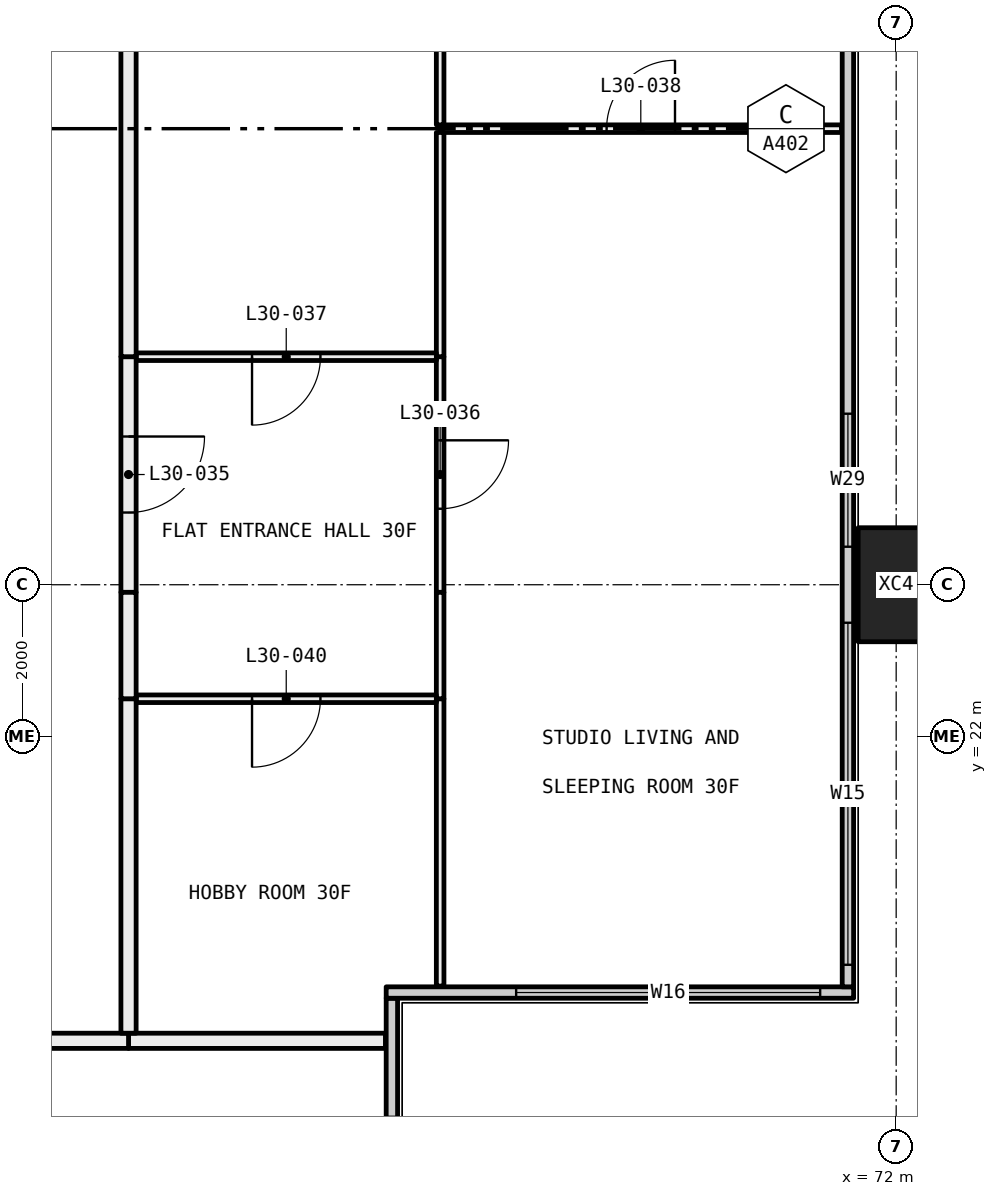
"""IFC4 building model, lengths in metres.
Left out: names, types, materials, properties, quantities, classifications, styles, units other than length and angle.
Written with IfcOpenShell. Run it as: python <this file> out.ifc"""

import sys

from ifc_helpers import new_model, si_unit, direction, frame, frame_2d, origin, origin_2d, place, context, subcontext, project, spatial, rectangle, hollow_rectangle, extrude, element, fill, save


model = new_model("IFC4")
c1 = context("Model", 3, precision=1e-05, world=origin(), true_north=direction((0.0, 1.0)))
c2 = subcontext(c1, "Body", "Model", "MODEL_VIEW")
j1 = project(units=[si_unit("LENGTHUNIT", "METRE"), si_unit("PLANEANGLEUNIT", "RADIAN")], contexts=[c1])
p1 = place(None, origin())
s1 = spatial("IfcSite", under=j1, at=p1, CompositionType="ELEMENT")
p2 = place(p1, origin())
s2 = spatial("IfcBuilding", under=s1, at=p2, CompositionType="ELEMENT")
p3 = place(p2, frame((0.0, 0.0, 117.3)))
s3 = spatial("IfcBuildingStorey", under=s2, at=p3, CompositionType="ELEMENT", Elevation=117.3)
p4 = place(p3, frame((72.0, 24.0, -0.4), z_axis=(0.0, 0.0, 1.0), x_axis=(0.0, 1.0, 0.0)))
e1 = element("IfcColumn", 1, at=p4, inside=s3, PredefinedType="COLUMN", context=c2, shape_type="SweptSolid", body=[
    extrude(hollow_rectangle(XDim=1.5, YDim=1.0, WallThickness=0.06, at=origin_2d()), origin(), (0.0, 0.0, 1.0), 3.45),
])
p5 = place(p3, frame((65.365, 12.71, 0.0), z_axis=(0.0, 0.0, 1.0), x_axis=(0.0, 1.0, 0.0)))
e2 = element("IfcWall", 2, at=p5, inside=s3, PredefinedType="ELEMENTEDWALL", context=c2, shape_type="SweptSolid", body=[
    extrude(rectangle(XDim=5.85, YDim=0.15, at=frame_2d((2.925, 0.0))), origin(), (0.0, 0.0, 1.0), 3.05),
])
p6 = place(p5, frame((0.29, 0.0, 0.45)))
e3 = element("IfcOpeningElement", 3, at=p6, cuts=e2, PredefinedType="OPENING", context=c2, shape_type="SweptSolid", body=[
    extrude(rectangle(XDim=4.0, YDim=2.55, at=frame_2d((2.0, 1.275))), frame((0.0, 0.085, 0.0), z_axis=(0.0, -1.0, 0.0), x_axis=(1.0, 0.0, 0.0)), (0.0, 0.0, 1.0), 0.17),
])
p7 = place(p3, frame((65.29, 18.635, 0.0), z_axis=(0.0, 0.0, 1.0), x_axis=(1.0, 0.0, 0.0)))
e4 = element("IfcWall", 4, at=p7, inside=s3, PredefinedType="ELEMENTEDWALL", context=c2, shape_type="SweptSolid", body=[
    extrude(rectangle(XDim=6.15, YDim=0.15, at=frame_2d((3.075, 0.0))), origin(), (0.0, 0.0, 1.0), 3.05),
])
p8 = place(p7, frame((1.71, 0.0, 0.45)))
e5 = element("IfcOpeningElement", 5, at=p8, cuts=e4, PredefinedType="OPENING", context=c2, shape_type="SweptSolid", body=[
    extrude(rectangle(XDim=4.0, YDim=2.55, at=frame_2d((2.0, 1.275))), frame((0.0, 0.085, 0.0), z_axis=(0.0, -1.0, 0.0), x_axis=(1.0, 0.0, 0.0)), (0.0, 0.0, 1.0), 0.17),
])
p9 = place(p3, frame((71.365, 18.71, 0.0), z_axis=(0.0, 0.0, 1.0), x_axis=(0.0, 1.0, 0.0)))
e6 = element("IfcWall", 6, at=p9, inside=s3, PredefinedType="ELEMENTEDWALL", context=c2, shape_type="SweptSolid", body=[
    extrude(rectangle(XDim=22.58, YDim=0.15, at=frame_2d((11.29, 0.0))), origin(), (0.0, 0.0, 1.0), 3.05),
])
p10 = place(p9, frame((0.29, 0.0, 0.45)))
e7 = element("IfcOpeningElement", 7, at=p10, cuts=e6, PredefinedType="OPENING", context=c2, shape_type="SweptSolid", body=[
    extrude(rectangle(XDim=4.5, YDim=2.55, at=frame_2d((2.25, 1.275))), frame((0.0, 0.085, 0.0), z_axis=(0.0, -1.0, 0.0), x_axis=(1.0, 0.0, 0.0)), (0.0, 0.0, 1.0), 0.17),
])
p11 = place(p9, frame((5.79, 0.0, 0.45)))
e8 = element("IfcOpeningElement", 8, at=p11, cuts=e6, PredefinedType="OPENING", context=c2, shape_type="SweptSolid", body=[
    extrude(rectangle(XDim=1.75, YDim=2.55, at=frame_2d((0.875, 1.275))), frame((0.0, 0.085, 0.0), z_axis=(0.0, -1.0, 0.0), x_axis=(1.0, 0.0, 0.0)), (0.0, 0.0, 1.0), 0.17),
])
p12 = place(p9, frame((15.04, 0.0, 0.45)))
e9 = element("IfcOpeningElement", 9, at=p12, cuts=e6, PredefinedType="OPENING", context=c2, shape_type="SweptSolid", body=[
    extrude(rectangle(XDim=1.75, YDim=2.55, at=frame_2d((0.875, 1.275))), frame((0.0, 0.085, 0.0), z_axis=(0.0, -1.0, 0.0), x_axis=(1.0, 0.0, 0.0)), (0.0, 0.0, 1.0), 0.17),
])
p13 = place(p9, frame((17.79, 0.0, 0.45)))
e10 = element("IfcOpeningElement", 10, at=p13, cuts=e6, PredefinedType="OPENING", context=c2, shape_type="SweptSolid", body=[
    extrude(rectangle(XDim=4.5, YDim=2.55, at=frame_2d((2.25, 1.275))), frame((0.0, 0.085, 0.0), z_axis=(0.0, -1.0, 0.0), x_axis=(1.0, 0.0, 0.0)), (0.0, 0.0, 1.0), 0.17),
])
p14 = place(p3, frame((65.28, 18.0, 0.0), z_axis=(0.0, 0.0, 1.0), x_axis=(-1.0, 0.0, 0.0)))
e11 = element("IfcWall", 11, at=p14, inside=s3, PredefinedType="PARTITIONING", context=c2, shape_type="SweptSolid", body=[
    extrude(rectangle(XDim=3.38, YDim=0.2, at=frame_2d((1.69, 0.0))), origin(), (0.0, 0.0, 1.0), 3.05),
])
p15 = place(p3, frame((61.9, 18.0, 0.0), z_axis=(0.0, 0.0, 1.0), x_axis=(-1.0, 0.0, 0.0)))
e12 = element("IfcWall", 12, at=p15, inside=s3, PredefinedType="PARTITIONING", context=c2, shape_type="SweptSolid", body=[
    extrude(rectangle(XDim=7.9, YDim=0.2, at=frame_2d((3.95, 0.0))), origin(), (0.0, 0.0, 1.0), 3.05),
])
p16 = place(p3, frame((71.28, 30.0, 0.0), z_axis=(0.0, 0.0, 1.0), x_axis=(-1.0, 0.0, 0.0)))
e13 = element("IfcWall", 13, at=p16, inside=s3, PredefinedType="PARTITIONING", context=c2, shape_type="SweptSolid", body=[
    extrude(rectangle(XDim=5.28, YDim=0.1, at=frame_2d((2.64, 0.0))), origin(), (0.0, 0.0, 1.0), 3.05),
])
p17 = place(p16, frame((2.19, 0.0, 0.0)))
e14 = element("IfcOpeningElement", 14, at=p17, cuts=e13, PredefinedType="OPENING", context=c2, shape_type="SweptSolid", body=[
    extrude(rectangle(XDim=0.9, YDim=2.1, at=frame_2d((0.45, 1.05))), frame((0.0, 0.06, 0.0), z_axis=(0.0, -1.0, 0.0), x_axis=(1.0, 0.0, 0.0)), (0.0, 0.0, 1.0), 0.12),
])
p18 = place(p3, frame((66.0, 22.5, 0.0), z_axis=(0.0, 0.0, 1.0), x_axis=(0.0, -1.0, 0.0)))
e15 = element("IfcWall", 15, at=p18, inside=s3, PredefinedType="PARTITIONING", context=c2, shape_type="SweptSolid", body=[
    extrude(rectangle(XDim=3.78, YDim=0.1, at=frame_2d((1.89, 0.0))), origin(), (0.0, 0.0, 1.0), 3.05),
])
p19 = place(p3, frame((66.0, 27.0, 0.0), z_axis=(0.0, 0.0, 1.0), x_axis=(0.0, -1.0, 0.0)))
e16 = element("IfcWall", 16, at=p19, inside=s3, PredefinedType="PARTITIONING", context=c2, shape_type="SweptSolid", body=[
    extrude(rectangle(XDim=3.1, YDim=0.1, at=frame_2d((1.55, 0.0))), origin(), (0.0, 0.0, 1.0), 2.45),
])
p20 = place(p19, frame((1.1, 0.0, 0.0)))
e17 = element("IfcOpeningElement", 17, at=p20, cuts=e16, PredefinedType="OPENING", context=c2, shape_type="SweptSolid", body=[
    extrude(rectangle(XDim=0.9, YDim=2.1, at=frame_2d((0.45, 1.05))), frame((0.0, 0.06, 0.0), z_axis=(0.0, -1.0, 0.0), x_axis=(1.0, 0.0, 0.0)), (0.0, 0.0, 1.0), 0.12),
])
p21 = place(p3, frame((66.0, 23.9, 0.0), z_axis=(0.0, 0.0, 1.0), x_axis=(0.0, -1.0, 0.0)))
e18 = element("IfcWall", 18, at=p21, inside=s3, PredefinedType="PARTITIONING", context=c2, shape_type="SweptSolid", body=[
    extrude(rectangle(XDim=1.4, YDim=0.1, at=frame_2d((0.7, 0.0))), origin(), (0.0, 0.0, 1.0), 3.05),
])
p22 = place(p3, frame((66.0, 29.95, 0.0), z_axis=(0.0, 0.0, 1.0), x_axis=(0.0, -1.0, 0.0)))
e19 = element("IfcWall", 19, at=p22, inside=s3, PredefinedType="PARTITIONING", context=c2, shape_type="SweptSolid", body=[
    extrude(rectangle(XDim=2.95, YDim=0.1, at=frame_2d((1.475, 0.0))), origin(), (0.0, 0.0, 1.0), 3.05),
])
p23 = place(p3, frame((66.0, 35.95, 0.0), z_axis=(0.0, 0.0, 1.0), x_axis=(0.0, -1.0, 0.0)))
e20 = element("IfcWall", 20, at=p23, inside=s3, PredefinedType="PARTITIONING", context=c2, shape_type="SweptSolid", body=[
    extrude(rectangle(XDim=5.9, YDim=0.1, at=frame_2d((2.95, 0.0))), origin(), (0.0, 0.0, 1.0), 2.45),
])
p24 = place(p3, frame((65.95, 22.5, 0.0), z_axis=(0.0, 0.0, 1.0), x_axis=(-1.0, 0.0, 0.0)))
e21 = element("IfcWall", 21, at=p24, inside=s3, PredefinedType="PARTITIONING", context=c2, shape_type="SweptSolid", body=[
    extrude(rectangle(XDim=3.95, YDim=0.1, at=frame_2d((1.975, 0.0))), origin(), (0.0, 0.0, 1.0), 3.05),
])
p25 = place(p24, frame((1.525, 0.0, 0.0)))
e22 = element("IfcOpeningElement", 22, at=p25, cuts=e21, PredefinedType="OPENING", context=c2, shape_type="SweptSolid", body=[
    extrude(rectangle(XDim=0.9, YDim=2.1, at=frame_2d((0.45, 1.05))), frame((0.0, 0.06, 0.0), z_axis=(0.0, -1.0, 0.0), x_axis=(1.0, 0.0, 0.0)), (0.0, 0.0, 1.0), 0.12),
])
p26 = place(p3, frame((61.9, 22.5, 0.0), z_axis=(0.0, 0.0, 1.0), x_axis=(0.0, -1.0, 0.0)))
e23 = element("IfcWall", 23, at=p26, inside=s3, PredefinedType="PARTITIONING", context=c2, shape_type="SweptSolid", body=[
    extrude(rectangle(XDim=4.4, YDim=0.2, at=frame_2d((2.2, 0.0))), origin(), (0.0, 0.0, 1.0), 3.05),
])
p27 = place(p3, frame((65.95, 27.0, 0.0), z_axis=(0.0, 0.0, 1.0), x_axis=(-1.0, 0.0, 0.0)))
e24 = element("IfcWall", 24, at=p27, inside=s3, PredefinedType="PARTITIONING", context=c2, shape_type="SweptSolid", body=[
    extrude(rectangle(XDim=3.95, YDim=0.1, at=frame_2d((1.975, 0.0))), origin(), (0.0, 0.0, 1.0), 3.05),
])
p28 = place(p27, frame((1.525, 0.0, 0.0)))
e25 = element("IfcOpeningElement", 25, at=p28, cuts=e24, PredefinedType="OPENING", context=c2, shape_type="SweptSolid", body=[
    extrude(rectangle(XDim=0.9, YDim=2.1, at=frame_2d((0.45, 1.05))), frame((0.0, 0.06, 0.0), z_axis=(0.0, -1.0, 0.0), x_axis=(1.0, 0.0, 0.0)), (0.0, 0.0, 1.0), 0.12),
])
p29 = place(p3, frame((61.9, 27.0, 0.0), z_axis=(0.0, 0.0, 1.0), x_axis=(0.0, -1.0, 0.0)))
e26 = element("IfcWall", 26, at=p29, inside=s3, PredefinedType="PARTITIONING", context=c2, shape_type="SweptSolid", body=[
    extrude(rectangle(XDim=3.1, YDim=0.2, at=frame_2d((1.55, 0.0))), origin(), (0.0, 0.0, 1.0), 2.45),
])
p30 = place(p29, frame((1.05, 0.0, 0.0)))
e27 = element("IfcOpeningElement", 27, at=p30, cuts=e26, PredefinedType="OPENING", context=c2, shape_type="SweptSolid", body=[
    extrude(rectangle(XDim=1.0, YDim=2.1, at=frame_2d((0.5, 1.05))), frame((0.0, 0.11, 0.0), z_axis=(0.0, -1.0, 0.0), x_axis=(1.0, 0.0, 0.0)), (0.0, 0.0, 1.0), 0.22),
])
p31 = place(p3, frame((61.9, 23.9, 0.0), z_axis=(0.0, 0.0, 1.0), x_axis=(0.0, -1.0, 0.0)))
e28 = element("IfcWall", 28, at=p31, inside=s3, PredefinedType="PARTITIONING", context=c2, shape_type="SweptSolid", body=[
    extrude(rectangle(XDim=1.4, YDim=0.2, at=frame_2d((0.7, 0.0))), origin(), (0.0, 0.0, 1.0), 3.05),
])
p32 = place(p3, frame((61.9, 35.9, 0.0), z_axis=(0.0, 0.0, 1.0), x_axis=(0.0, -1.0, 0.0)))
e29 = element("IfcWall", 29, at=p32, inside=s3, PredefinedType="PARTITIONING", context=c2, shape_type="SweptSolid", body=[
    extrude(rectangle(XDim=8.9, YDim=0.2, at=frame_2d((4.45, 0.0))), origin(), (0.0, 0.0, 1.0), 3.05),
])
p33 = place(p8, origin())
e30 = element("IfcWindow", 30, at=p33, inside=s3, PartitioningType="SINGLE_PANEL", PredefinedType="WINDOW", context=c2, shape_type="SweptSolid", body=[
    extrude(rectangle(XDim=4.0, YDim=2.55, at=frame_2d((2.0, 1.275))), frame((0.0, 0.03, 0.0), z_axis=(0.0, -1.0, 0.0), x_axis=(1.0, 0.0, 0.0)), (0.0, 0.0, 1.0), 0.06),
])
fill(e5, e30)
p34 = place(p10, origin())
e31 = element("IfcWindow", 31, at=p34, inside=s3, PartitioningType="SINGLE_PANEL", PredefinedType="WINDOW", context=c2, shape_type="SweptSolid", body=[
    extrude(rectangle(XDim=4.5, YDim=2.55, at=frame_2d((2.25, 1.275))), frame((0.0, 0.03, 0.0), z_axis=(0.0, -1.0, 0.0), x_axis=(1.0, 0.0, 0.0)), (0.0, 0.0, 1.0), 0.06),
])
fill(e7, e31)
p35 = place(p11, origin())
e32 = element("IfcWindow", 32, at=p35, inside=s3, PartitioningType="SINGLE_PANEL", PredefinedType="WINDOW", context=c2, shape_type="SweptSolid", body=[
    extrude(rectangle(XDim=1.75, YDim=2.55, at=frame_2d((0.875, 1.275))), frame((0.0, 0.03, 0.0), z_axis=(0.0, -1.0, 0.0), x_axis=(1.0, 0.0, 0.0)), (0.0, 0.0, 1.0), 0.06),
])
fill(e8, e32)
p36 = place(p30, origin())
e33 = element("IfcDoor", 33, at=p36, inside=s3, OperationType="SINGLE_SWING_RIGHT", PredefinedType="DOOR", context=c2, shape_type="SweptSolid", body=[
    extrude(rectangle(XDim=1.0, YDim=2.1, at=frame_2d((0.5, 1.05))), frame((0.0, 0.025, 0.0), z_axis=(0.0, -1.0, 0.0), x_axis=(1.0, 0.0, 0.0)), (0.0, 0.0, 1.0), 0.05),
])
fill(e27, e33)
p37 = place(p20, origin())
e34 = element("IfcDoor", 34, at=p37, inside=s3, OperationType="SINGLE_SWING_RIGHT", PredefinedType="DOOR", context=c2, shape_type="SweptSolid", body=[
    extrude(rectangle(XDim=0.9, YDim=2.1, at=frame_2d((0.45, 1.05))), frame((0.0, 0.025, 0.0), z_axis=(0.0, -1.0, 0.0), x_axis=(1.0, 0.0, 0.0)), (0.0, 0.0, 1.0), 0.05),
])
fill(e17, e34)
p38 = place(p28, origin())
e35 = element("IfcDoor", 35, at=p38, inside=s3, OperationType="SINGLE_SWING_LEFT", PredefinedType="DOOR", context=c2, shape_type="SweptSolid", body=[
    extrude(rectangle(XDim=0.9, YDim=2.1, at=frame_2d((0.45, 1.05))), frame((0.0, 0.025, 0.0), z_axis=(0.0, -1.0, 0.0), x_axis=(1.0, 0.0, 0.0)), (0.0, 0.0, 1.0), 0.05),
])
fill(e25, e35)
p39 = place(p17, frame((0.9, 0.0, 0.0), x_axis=(-1.0, 0.0, 0.0)))
e36 = element("IfcDoor", 36, at=p39, inside=s3, OperationType="SINGLE_SWING_LEFT", PredefinedType="DOOR", context=c2, shape_type="SweptSolid", body=[
    extrude(rectangle(XDim=0.9, YDim=2.1, at=frame_2d((0.45, 1.05))), frame((0.0, 0.025, 0.0), z_axis=(0.0, -1.0, 0.0), x_axis=(1.0, 0.0, 0.0)), (0.0, 0.0, 1.0), 0.05),
])
fill(e14, e36)
p40 = place(p25, origin())
e37 = element("IfcDoor", 37, at=p40, inside=s3, OperationType="SINGLE_SWING_LEFT", PredefinedType="DOOR", context=c2, shape_type="SweptSolid", body=[
    extrude(rectangle(XDim=0.9, YDim=2.1, at=frame_2d((0.45, 1.05))), frame((0.0, 0.025, 0.0), z_axis=(0.0, -1.0, 0.0), x_axis=(1.0, 0.0, 0.0)), (0.0, 0.0, 1.0), 0.05),
])
fill(e22, e37)
save(model, sys.argv[1])
